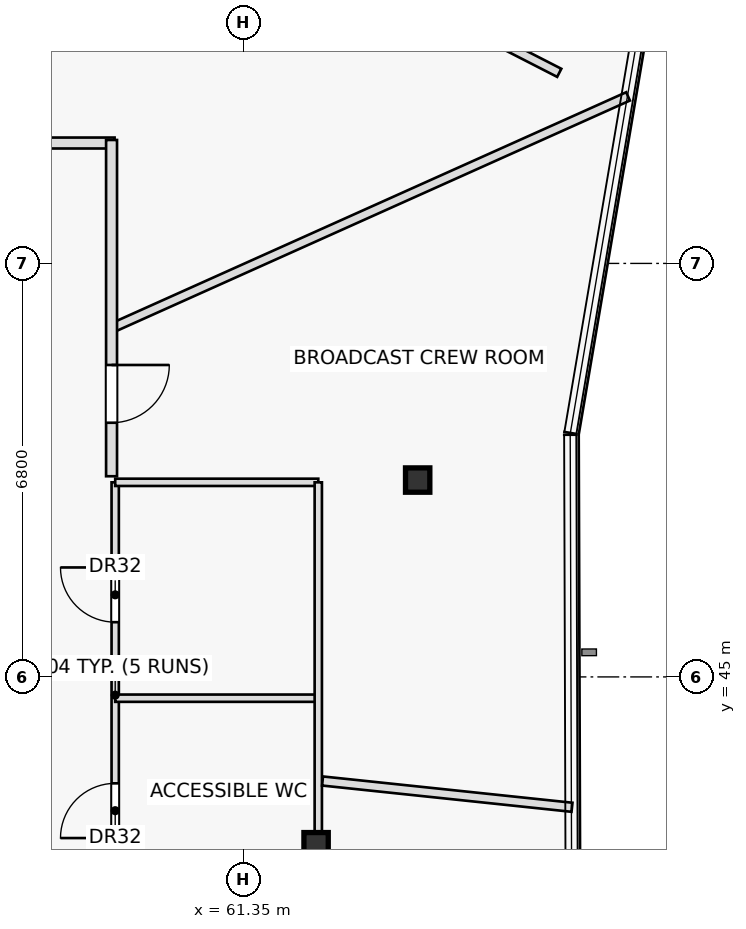
"""IFC4 building model, lengths in metres.
Left out: names, types, materials, properties, quantities, classifications, styles, units other than length and angle.
Written with IfcOpenShell. Run it as: python <this file> out.ifc"""

import sys

from ifc_helpers import new_model, si_unit, direction, frame, frame_2d, origin, origin_2d, place, context, subcontext, project, spatial, rectangle, hollow_rectangle, extrude, element, fill, save


model = new_model("IFC4")
c1 = context("Model", 3, precision=1e-05, world=origin(), true_north=direction((0.0, 1.0)))
c2 = subcontext(c1, "Body", "Model", "MODEL_VIEW")
j1 = project(units=[si_unit("LENGTHUNIT", "METRE"), si_unit("PLANEANGLEUNIT", "RADIAN")], contexts=[c1])
p1 = place(None, origin())
s1 = spatial("IfcSite", under=j1, at=p1, CompositionType="ELEMENT")
p2 = place(p1, origin())
s2 = spatial("IfcBuilding", under=s1, at=p2, CompositionType="ELEMENT")
p3 = place(p2, frame((0.0, 0.0, 309.5)))
s3 = spatial("IfcBuildingStorey", under=s2, at=p3, CompositionType="ELEMENT", Elevation=309.5)
for number, where, z_axis, x_axis in (
    (1, (62.544, 42.24, 0.0), (0.0, 0.0, 1.0), (1.0, 0.0, 0.0)),
    (2, (64.214, 48.237, 0.0), (0.0, 0.0, 1.0), (1.0, 0.0, 0.0)),
):
    element("IfcColumn", number, at=place(p3, frame(where, z_axis=z_axis, x_axis=x_axis)), inside=s3, PredefinedType="COLUMN", context=c2, shape_type="SweptSolid", body=[
        extrude(hollow_rectangle(XDim=0.4, YDim=0.4, WallThickness=0.025, at=origin_2d()), origin(), (0.0, 0.0, 1.0), 3.7),
    ])
p4 = place(p3, frame((66.543, 54.934, 0.0), z_axis=(0.0, 0.0, 1.0), x_axis=(-0.889966951661, 0.456025026673, 0.0)))
e3 = element("IfcWall", 3, at=p4, inside=s3, PredefinedType="PARTITIONING", context=c2, shape_type="SweptSolid", body=[
    extrude(rectangle(XDim=10.879, YDim=0.15, at=frame_2d((5.439, 0.0))), origin(), (0.0, 0.0, 1.0), 3.275),
])
p5 = place(p3, frame((59.24, 41.2, 0.0), z_axis=(0.0, 0.0, 1.0), x_axis=(0.0, 1.0, 0.0)))
e4 = element("IfcWall", 4, at=p5, inside=s3, PredefinedType="PARTITIONING", context=c2, shape_type="SweptSolid", body=[
    extrude(rectangle(XDim=7.0, YDim=0.12, at=frame_2d((3.5, 0.0))), origin(), (0.0, 0.0, 1.0), 3.7),
])
p6 = place(p5, frame((1.15, 0.0, 0.0)))
e5 = element("IfcOpeningElement", 5, at=p6, cuts=e4, PredefinedType="OPENING", context=c2, shape_type="SweptSolid", body=[
    extrude(rectangle(XDim=0.9, YDim=2.05, at=frame_2d((0.45, 1.025))), frame((0.0, 0.07, 0.0), z_axis=(0.0, -1.0, 0.0), x_axis=(1.0, 0.0, 0.0)), (0.0, 0.0, 1.0), 0.14),
])
p7 = place(p5, frame((4.7, 0.0, 0.0)))
e6 = element("IfcOpeningElement", 6, at=p7, cuts=e4, PredefinedType="OPENING", context=c2, shape_type="SweptSolid", body=[
    extrude(rectangle(XDim=0.9, YDim=2.05, at=frame_2d((0.45, 1.025))), frame((0.0, 0.07, 0.0), z_axis=(0.0, -1.0, 0.0), x_axis=(1.0, 0.0, 0.0)), (0.0, 0.0, 1.0), 0.14),
])
for number, where, z_axis, x_axis in (
    (7, (59.24, 44.65, 0.0), (0.0, 0.0, 1.0), (1.0, 0.0, 0.0)),
    (8, (59.24, 48.2, 0.0), (0.0, 0.0, 1.0), (1.0, 0.0, 0.0)),
):
    element("IfcWall", number, at=place(p3, frame(where, z_axis=z_axis, x_axis=x_axis)), inside=s3, PredefinedType="PARTITIONING", context=c2, shape_type="SweptSolid", body=[
        extrude(rectangle(XDim=3.34, YDim=0.12, at=frame_2d((1.67, 0.0))), origin(), (0.0, 0.0, 1.0), 3.7),
    ])
p8 = place(p3, frame((62.58, 41.2, 0.0), z_axis=(0.0, 0.0, 1.0), x_axis=(0.0, 1.0, 0.0)))
e9 = element("IfcWall", 9, at=p8, inside=s3, PredefinedType="PARTITIONING", context=c2, shape_type="SweptSolid", body=[
    extrude(rectangle(XDim=7.0, YDim=0.12, at=frame_2d((3.5, 0.0))), origin(), (0.0, 0.0, 1.0), 3.275),
])
p9 = place(p3, frame((62.65, 43.288, 0.0), z_axis=(0.0, 0.0, 1.0), x_axis=(0.99449896567, -0.104746395075, 0.0)))
e10 = element("IfcWall", 10, at=p9, inside=s3, PredefinedType="PARTITIONING", context=c2, shape_type="SweptSolid", body=[
    extrude(rectangle(XDim=4.125, YDim=0.15, at=frame_2d((2.063, 0.0))), origin(), (0.0, 0.0, 1.0), 3.7),
])
p10 = place(p3, frame((59.18, 50.735, 0.0), z_axis=(0.0, 0.0, 1.0), x_axis=(0.912351299783, 0.40940823854, 0.0)))
e11 = element("IfcWall", 11, at=p10, inside=s3, PredefinedType="PARTITIONING", context=c2, shape_type="SweptSolid", body=[
    extrude(rectangle(XDim=9.311, YDim=0.15, at=frame_2d((4.655, 0.0))), origin(), (0.0, 0.0, 1.0), 3.275),
])
p11 = place(p3, frame((54.3, 53.78, 0.0), z_axis=(0.0, 0.0, 1.0), x_axis=(1.0, 0.0, 0.0)))
e12 = element("IfcWall", 12, at=p11, inside=s3, PredefinedType="PARTITIONING", context=c2, shape_type="SweptSolid", body=[
    extrude(rectangle(XDim=4.93, YDim=0.18, at=frame_2d((2.465, 0.0))), origin(), (0.0, 0.0, 1.0), 3.7),
])
p12 = place(p11, frame((1.99, 0.0, 0.0)))
e13 = element("IfcOpeningElement", 13, at=p12, cuts=e12, PredefinedType="OPENING", context=c2, shape_type="SweptSolid", body=[
    extrude(rectangle(XDim=0.95, YDim=2.05, at=frame_2d((0.475, 1.025))), frame((0.0, 0.1, 0.0), z_axis=(0.0, -1.0, 0.0), x_axis=(1.0, 0.0, 0.0)), (0.0, 0.0, 1.0), 0.2),
])
p13 = place(p3, frame((59.18, 53.83, 0.0), z_axis=(0.0, 0.0, 1.0), x_axis=(0.0, -1.0, 0.0)))
e14 = element("IfcWall", 14, at=p13, inside=s3, PredefinedType="PARTITIONING", context=c2, shape_type="SweptSolid", body=[
    extrude(rectangle(XDim=5.53, YDim=0.18, at=frame_2d((2.765, 0.0))), origin(), (0.0, 0.0, 1.0), 3.7),
])
p14 = place(p13, frame((3.7, 0.0, 0.0)))
e15 = element("IfcOpeningElement", 15, at=p14, cuts=e14, PredefinedType="OPENING", context=c2, shape_type="SweptSolid", body=[
    extrude(rectangle(XDim=0.95, YDim=2.05, at=frame_2d((0.475, 1.025))), frame((0.0, 0.1, 0.0), z_axis=(0.0, -1.0, 0.0), x_axis=(1.0, 0.0, 0.0)), (0.0, 0.0, 1.0), 0.2),
])
p15 = place(p6, origin())
e16 = element("IfcDoor", 16, at=p15, inside=s3, OperationType="SINGLE_SWING_LEFT", PredefinedType="DOOR", context=c2, shape_type="SweptSolid", body=[
    extrude(rectangle(XDim=0.9, YDim=2.05, at=frame_2d((0.45, 1.025))), frame((0.0, 0.025, 0.0), z_axis=(0.0, -1.0, 0.0), x_axis=(1.0, 0.0, 0.0)), (0.0, 0.0, 1.0), 0.05),
])
fill(e5, e16)
p16 = place(p7, origin())
e17 = element("IfcDoor", 17, at=p16, inside=s3, OperationType="SINGLE_SWING_RIGHT", PredefinedType="DOOR", context=c2, shape_type="SweptSolid", body=[
    extrude(rectangle(XDim=0.9, YDim=2.05, at=frame_2d((0.45, 1.025))), frame((0.0, 0.025, 0.0), z_axis=(0.0, -1.0, 0.0), x_axis=(1.0, 0.0, 0.0)), (0.0, 0.0, 1.0), 0.05),
])
fill(e6, e17)
p17 = place(p14, origin())
e18 = element("IfcDoor", 18, at=p17, inside=s3, OperationType="SINGLE_SWING_LEFT", PredefinedType="DOOR", context=c2, shape_type="SweptSolid", body=[
    extrude(rectangle(XDim=0.95, YDim=2.05, at=frame_2d((0.475, 1.025))), frame((0.0, 0.025, 0.0), z_axis=(0.0, -1.0, 0.0), x_axis=(1.0, 0.0, 0.0)), (0.0, 0.0, 1.0), 0.05),
])
fill(e15, e18)
save(model, sys.argv[1])
